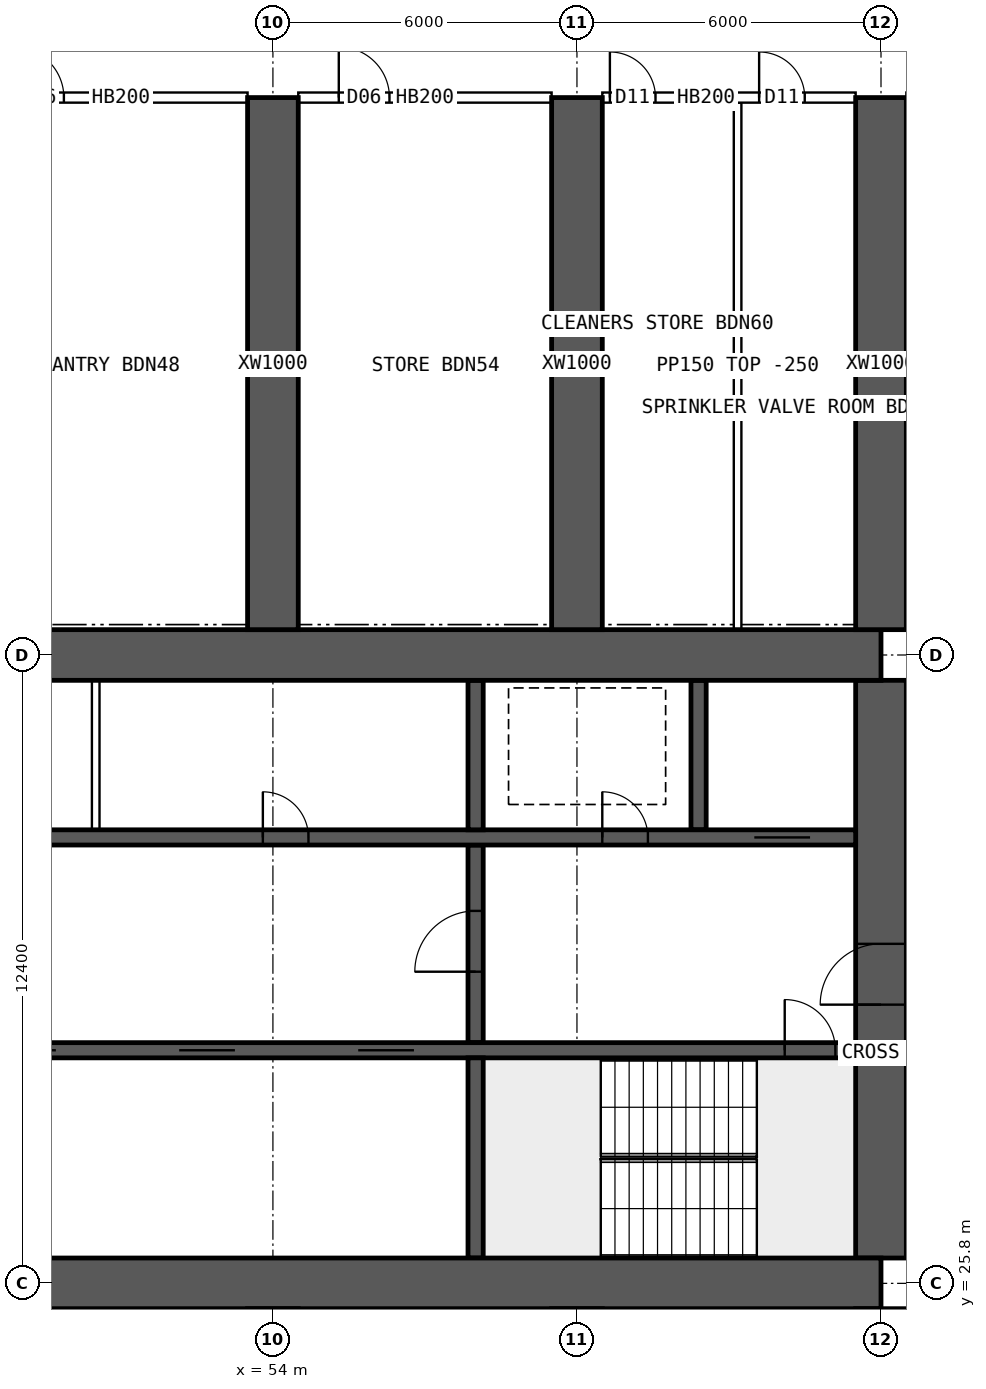
"""IFC4 building model, lengths in metres.
Left out: names, types, materials, properties, quantities, classifications, styles, units other than length and angle.
Written with IfcOpenShell. Run it as: python <this file> out.ifc"""

import sys

from ifc_helpers import new_model, si_unit, direction, frame, frame_2d, origin, place, context, subcontext, project, spatial, rectangle, extrude, element, fill, save


model = new_model("IFC4")
c1 = context("Model", 3, precision=1e-05, world=origin(), true_north=direction((0.0, 1.0)))
c2 = subcontext(c1, "Body", "Model", "MODEL_VIEW")
j1 = project(units=[si_unit("LENGTHUNIT", "METRE"), si_unit("PLANEANGLEUNIT", "RADIAN")], contexts=[c1])
p1 = place(None, origin())
s1 = spatial("IfcSite", under=j1, at=p1, CompositionType="ELEMENT")
p2 = place(p1, origin())
s2 = spatial("IfcBuilding", under=s1, at=p2, CompositionType="ELEMENT")
p3 = place(p2, frame((0.0, 0.0, 16.0)))
s3 = spatial("IfcBuildingStorey", under=s2, at=p3, CompositionType="ELEMENT", Elevation=16.0)
for number, where, z_axis, x_axis in (
    (1, (18.0, 25.8, 0.0), (0.0, 0.0, 1.0), (1.0, 0.0, 0.0)),
    (2, (18.0, 38.2, 0.0), (0.0, 0.0, 1.0), (1.0, 0.0, 0.0)),
):
    element("IfcWall", number, at=place(p3, frame(where, z_axis=z_axis, x_axis=x_axis)), inside=s3, PredefinedType="SHEAR", context=c2, shape_type="SweptSolid", body=[
        extrude(rectangle(XDim=48.0, YDim=1.0, at=frame_2d((24.0, 0.0))), origin(), (0.0, 0.0, 1.0), 4.2),
    ])
p4 = place(p3, frame((66.0, 26.3, 0.0), z_axis=(0.0, 0.0, 1.0), x_axis=(0.0, 1.0, 0.0)))
e3 = element("IfcWall", 3, at=p4, inside=s3, PredefinedType="SHEAR", context=c2, shape_type="SweptSolid", body=[
    extrude(rectangle(XDim=11.4, YDim=1.0, at=frame_2d((5.7, 0.0))), origin(), (0.0, 0.0, 1.0), 4.2),
])
p5 = place(p4, frame((5.0, 0.0, 0.0)))
e4 = element("IfcOpeningElement", 4, at=p5, cuts=e3, PredefinedType="OPENING", context=c2, shape_type="SweptSolid", body=[
    extrude(rectangle(XDim=1.2, YDim=2.1, at=frame_2d((0.6, 1.05))), frame((0.0, 0.51, 0.0), z_axis=(0.0, -1.0, 0.0), x_axis=(1.0, 0.0, 0.0)), (0.0, 0.0, 1.0), 1.02),
])
p6 = place(p3, frame((18.5, 30.4, 0.0), z_axis=(0.0, 0.0, 1.0), x_axis=(1.0, 0.0, 0.0)))
e5 = element("IfcWall", 5, at=p6, inside=s3, PredefinedType="SHEAR", context=c2, shape_type="SweptSolid", body=[
    extrude(rectangle(XDim=47.0, YDim=0.3, at=frame_2d((23.5, 0.0))), origin(), (0.0, 0.0, 1.0), 4.2),
])
p7 = place(p6, frame((0.4, 0.0, 0.0)))
e6 = element("IfcOpeningElement", 6, at=p7, cuts=e5, PredefinedType="OPENING", context=c2, shape_type="SweptSolid", body=[
    extrude(rectangle(XDim=1.0, YDim=2.1, at=frame_2d((0.5, 1.05))), frame((0.0, 0.16, 0.0), z_axis=(0.0, -1.0, 0.0), x_axis=(1.0, 0.0, 0.0)), (0.0, 0.0, 1.0), 0.32),
])
p8 = place(p6, frame((45.6, 0.0, 0.0)))
e7 = element("IfcOpeningElement", 7, at=p8, cuts=e5, PredefinedType="OPENING", context=c2, shape_type="SweptSolid", body=[
    extrude(rectangle(XDim=1.0, YDim=2.1, at=frame_2d((0.5, 1.05))), frame((0.0, 0.16, 0.0), z_axis=(0.0, -1.0, 0.0), x_axis=(1.0, 0.0, 0.0)), (0.0, 0.0, 1.0), 0.32),
])
p9 = place(p6, frame((8.25, 0.0, 0.0)))
e8 = element("IfcOpeningElement", 8, at=p9, cuts=e5, PredefinedType="OPENING", context=c2, shape_type="SweptSolid", body=[
    extrude(rectangle(XDim=1.1, YDim=2.1, at=frame_2d((0.55, 1.05))), frame((0.0, 0.16, 0.0), z_axis=(0.0, -1.0, 0.0), x_axis=(1.0, 0.0, 0.0)), (0.0, 0.0, 1.0), 0.32),
])
p10 = place(p6, frame((10.85, 0.0, 0.0)))
e9 = element("IfcOpeningElement", 9, at=p10, cuts=e5, PredefinedType="OPENING", context=c2, shape_type="SweptSolid", body=[
    extrude(rectangle(XDim=1.1, YDim=2.1, at=frame_2d((0.55, 1.05))), frame((0.0, 0.16, 0.0), z_axis=(0.0, -1.0, 0.0), x_axis=(1.0, 0.0, 0.0)), (0.0, 0.0, 1.0), 0.32),
])
p11 = place(p6, frame((13.45, 0.0, 0.0)))
e10 = element("IfcOpeningElement", 10, at=p11, cuts=e5, PredefinedType="OPENING", context=c2, shape_type="SweptSolid", body=[
    extrude(rectangle(XDim=1.1, YDim=2.1, at=frame_2d((0.55, 1.05))), frame((0.0, 0.16, 0.0), z_axis=(0.0, -1.0, 0.0), x_axis=(1.0, 0.0, 0.0)), (0.0, 0.0, 1.0), 0.32),
])
p12 = place(p6, frame((16.05, 0.0, 0.0)))
e11 = element("IfcOpeningElement", 11, at=p12, cuts=e5, PredefinedType="OPENING", context=c2, shape_type="SweptSolid", body=[
    extrude(rectangle(XDim=1.1, YDim=2.1, at=frame_2d((0.55, 1.05))), frame((0.0, 0.16, 0.0), z_axis=(0.0, -1.0, 0.0), x_axis=(1.0, 0.0, 0.0)), (0.0, 0.0, 1.0), 0.32),
])
p13 = place(p6, frame((30.117, 0.0, 0.0)))
e12 = element("IfcOpeningElement", 12, at=p13, cuts=e5, PredefinedType="OPENING", context=c2, shape_type="SweptSolid", body=[
    extrude(rectangle(XDim=1.1, YDim=2.1, at=frame_2d((0.55, 1.05))), frame((0.0, 0.16, 0.0), z_axis=(0.0, -1.0, 0.0), x_axis=(1.0, 0.0, 0.0)), (0.0, 0.0, 1.0), 0.32),
])
p14 = place(p6, frame((33.65, 0.0, 0.0)))
e13 = element("IfcOpeningElement", 13, at=p14, cuts=e5, PredefinedType="OPENING", context=c2, shape_type="SweptSolid", body=[
    extrude(rectangle(XDim=1.1, YDim=2.1, at=frame_2d((0.55, 1.05))), frame((0.0, 0.16, 0.0), z_axis=(0.0, -1.0, 0.0), x_axis=(1.0, 0.0, 0.0)), (0.0, 0.0, 1.0), 0.32),
])
p15 = place(p6, frame((37.183, 0.0, 0.0)))
e14 = element("IfcOpeningElement", 14, at=p15, cuts=e5, PredefinedType="OPENING", context=c2, shape_type="SweptSolid", body=[
    extrude(rectangle(XDim=1.1, YDim=2.1, at=frame_2d((0.55, 1.05))), frame((0.0, 0.16, 0.0), z_axis=(0.0, -1.0, 0.0), x_axis=(1.0, 0.0, 0.0)), (0.0, 0.0, 1.0), 0.32),
])
p16 = place(p3, frame((18.5, 34.6, 0.0), z_axis=(0.0, 0.0, 1.0), x_axis=(1.0, 0.0, 0.0)))
e15 = element("IfcWall", 15, at=p16, inside=s3, PredefinedType="SHEAR", context=c2, shape_type="SweptSolid", body=[
    extrude(rectangle(XDim=47.0, YDim=0.3, at=frame_2d((23.5, 0.0))), origin(), (0.0, 0.0, 1.0), 4.2),
])
p17 = place(p16, frame((0.9, 0.0, 0.0)))
e16 = element("IfcOpeningElement", 16, at=p17, cuts=e15, PredefinedType="OPENING", context=c2, shape_type="SweptSolid", body=[
    extrude(rectangle(XDim=1.1, YDim=2.1, at=frame_2d((0.55, 1.05))), frame((0.0, 0.16, 0.0), z_axis=(0.0, -1.0, 0.0), x_axis=(1.0, 0.0, 0.0)), (0.0, 0.0, 1.0), 0.32),
])
p18 = place(p16, frame((45.0, 0.0, 0.0)))
e17 = element("IfcOpeningElement", 17, at=p18, cuts=e15, PredefinedType="OPENING", context=c2, shape_type="SweptSolid", body=[
    extrude(rectangle(XDim=1.1, YDim=2.1, at=frame_2d((0.55, 1.05))), frame((0.0, 0.16, 0.0), z_axis=(0.0, -1.0, 0.0), x_axis=(1.0, 0.0, 0.0)), (0.0, 0.0, 1.0), 0.32),
])
p19 = place(p16, frame((4.1, 0.0, 0.0)))
e18 = element("IfcOpeningElement", 18, at=p19, cuts=e15, PredefinedType="OPENING", context=c2, shape_type="SweptSolid", body=[
    extrude(rectangle(XDim=0.9, YDim=2.1, at=frame_2d((0.45, 1.05))), frame((0.0, 0.16, 0.0), z_axis=(0.0, -1.0, 0.0), x_axis=(1.0, 0.0, 0.0)), (0.0, 0.0, 1.0), 0.32),
])
p20 = place(p16, frame((42.0, 0.0, 0.0)))
e19 = element("IfcOpeningElement", 19, at=p20, cuts=e15, PredefinedType="OPENING", context=c2, shape_type="SweptSolid", body=[
    extrude(rectangle(XDim=0.9, YDim=2.1, at=frame_2d((0.45, 1.05))), frame((0.0, 0.16, 0.0), z_axis=(0.0, -1.0, 0.0), x_axis=(1.0, 0.0, 0.0)), (0.0, 0.0, 1.0), 0.32),
])
p21 = place(p16, frame((8.875, 0.0, 0.0)))
e20 = element("IfcOpeningElement", 20, at=p21, cuts=e15, PredefinedType="OPENING", context=c2, shape_type="SweptSolid", body=[
    extrude(rectangle(XDim=0.9, YDim=2.1, at=frame_2d((0.45, 1.05))), frame((0.0, 0.16, 0.0), z_axis=(0.0, -1.0, 0.0), x_axis=(1.0, 0.0, 0.0)), (0.0, 0.0, 1.0), 0.32),
])
p22 = place(p16, frame((12.849, 0.0, 0.0)))
e21 = element("IfcOpeningElement", 21, at=p22, cuts=e15, PredefinedType="OPENING", context=c2, shape_type="SweptSolid", body=[
    extrude(rectangle(XDim=0.9, YDim=2.1, at=frame_2d((0.45, 1.05))), frame((0.0, 0.16, 0.0), z_axis=(0.0, -1.0, 0.0), x_axis=(1.0, 0.0, 0.0)), (0.0, 0.0, 1.0), 0.32),
])
p23 = place(p16, frame((16.496, 0.0, 0.0)))
e22 = element("IfcOpeningElement", 22, at=p23, cuts=e15, PredefinedType="OPENING", context=c2, shape_type="SweptSolid", body=[
    extrude(rectangle(XDim=0.9, YDim=2.1, at=frame_2d((0.45, 1.05))), frame((0.0, 0.16, 0.0), z_axis=(0.0, -1.0, 0.0), x_axis=(1.0, 0.0, 0.0)), (0.0, 0.0, 1.0), 0.32),
])
p24 = place(p16, frame((20.255, 0.0, 0.0)))
e23 = element("IfcOpeningElement", 23, at=p24, cuts=e15, PredefinedType="OPENING", context=c2, shape_type="SweptSolid", body=[
    extrude(rectangle(XDim=0.9, YDim=2.1, at=frame_2d((0.45, 1.05))), frame((0.0, 0.16, 0.0), z_axis=(0.0, -1.0, 0.0), x_axis=(1.0, 0.0, 0.0)), (0.0, 0.0, 1.0), 0.32),
])
p25 = place(p16, frame((24.661, 0.0, 0.0)))
e24 = element("IfcOpeningElement", 24, at=p25, cuts=e15, PredefinedType="OPENING", context=c2, shape_type="SweptSolid", body=[
    extrude(rectangle(XDim=0.9, YDim=2.1, at=frame_2d((0.45, 1.05))), frame((0.0, 0.16, 0.0), z_axis=(0.0, -1.0, 0.0), x_axis=(1.0, 0.0, 0.0)), (0.0, 0.0, 1.0), 0.32),
])
p26 = place(p16, frame((27.458, 0.0, 0.0)))
e25 = element("IfcOpeningElement", 25, at=p26, cuts=e15, PredefinedType="OPENING", context=c2, shape_type="SweptSolid", body=[
    extrude(rectangle(XDim=0.9, YDim=2.1, at=frame_2d((0.45, 1.05))), frame((0.0, 0.16, 0.0), z_axis=(0.0, -1.0, 0.0), x_axis=(1.0, 0.0, 0.0)), (0.0, 0.0, 1.0), 0.32),
])
p27 = place(p16, frame((29.831, 0.0, 0.0)))
e26 = element("IfcOpeningElement", 26, at=p27, cuts=e15, PredefinedType="OPENING", context=c2, shape_type="SweptSolid", body=[
    extrude(rectangle(XDim=0.9, YDim=2.1, at=frame_2d((0.45, 1.05))), frame((0.0, 0.16, 0.0), z_axis=(0.0, -1.0, 0.0), x_axis=(1.0, 0.0, 0.0)), (0.0, 0.0, 1.0), 0.32),
])
p28 = place(p16, frame((35.302, 0.0, 0.0)))
e27 = element("IfcOpeningElement", 27, at=p28, cuts=e15, PredefinedType="OPENING", context=c2, shape_type="SweptSolid", body=[
    extrude(rectangle(XDim=0.9, YDim=2.1, at=frame_2d((0.45, 1.05))), frame((0.0, 0.16, 0.0), z_axis=(0.0, -1.0, 0.0), x_axis=(1.0, 0.0, 0.0)), (0.0, 0.0, 1.0), 0.32),
])
p29 = place(p3, frame((58.0, 26.3, 0.0), z_axis=(0.0, 0.0, 1.0), x_axis=(0.0, 1.0, 0.0)))
e28 = element("IfcWall", 28, at=p29, inside=s3, PredefinedType="SHEAR", context=c2, shape_type="SweptSolid", body=[
    extrude(rectangle(XDim=3.95, YDim=0.3, at=frame_2d((1.975, 0.0))), origin(), (0.0, 0.0, 1.0), 4.2),
])
p30 = place(p3, frame((58.0, 30.55, 0.0), z_axis=(0.0, 0.0, 1.0), x_axis=(0.0, 1.0, 0.0)))
e29 = element("IfcWall", 29, at=p30, inside=s3, PredefinedType="SHEAR", context=c2, shape_type="SweptSolid", body=[
    extrude(rectangle(XDim=3.9, YDim=0.3, at=frame_2d((1.95, 0.0))), origin(), (0.0, 0.0, 1.0), 4.2),
])
p31 = place(p30, frame((1.4, 0.0, 0.0)))
e30 = element("IfcOpeningElement", 30, at=p31, cuts=e29, PredefinedType="OPENING", context=c2, shape_type="SweptSolid", body=[
    extrude(rectangle(XDim=1.2, YDim=2.1, at=frame_2d((0.6, 1.05))), frame((0.0, 0.16, 0.0), z_axis=(0.0, -1.0, 0.0), x_axis=(1.0, 0.0, 0.0)), (0.0, 0.0, 1.0), 0.32),
])
for number, where, z_axis, x_axis in (
    (31, (62.4, 34.75, 0.0), (0.0, 0.0, 1.0), (0.0, 1.0, 0.0)),
    (32, (58.0, 34.75, 0.0), (0.0, 0.0, 1.0), (0.0, 1.0, 0.0)),
):
    element("IfcWall", number, at=place(p3, frame(where, z_axis=z_axis, x_axis=x_axis)), inside=s3, PredefinedType="SHEAR", context=c2, shape_type="SweptSolid", body=[
        extrude(rectangle(XDim=2.95, YDim=0.3, at=frame_2d((1.475, 0.0))), origin(), (0.0, 0.0, 1.0), 4.2),
    ])
for number, where, z_axis, x_axis in (
    (33, (54.0, 38.7, 0.0), (0.0, 0.0, 1.0), (0.0, 1.0, 0.0)),
    (34, (60.0, 38.7, 0.0), (0.0, 0.0, 1.0), (0.0, 1.0, 0.0)),
    (35, (66.0, 38.7, 0.0), (0.0, 0.0, 1.0), (0.0, 1.0, 0.0)),
):
    element("IfcWall", number, at=place(p3, frame(where, z_axis=z_axis, x_axis=x_axis)), inside=s3, PredefinedType="SHEAR", context=c2, shape_type="SweptSolid", body=[
        extrude(rectangle(XDim=10.5, YDim=1.0, at=frame_2d((5.25, 0.0))), origin(), (0.0, 0.0, 1.0), 4.2),
    ])
p32 = place(p3, frame((50.503, 34.75, 0.0), z_axis=(0.0, 0.0, 1.0), x_axis=(0.0, 1.0, 0.0)))
e36 = element("IfcWall", 36, at=p32, inside=s3, PredefinedType="SOLIDWALL", context=c2, shape_type="SweptSolid", body=[
    extrude(rectangle(XDim=2.95, YDim=0.15, at=frame_2d((1.475, 0.0))), origin(), (0.0, 0.0, 1.0), 3.95),
])
p33 = place(p3, frame((48.5, 49.2, 0.0), z_axis=(0.0, 0.0, 1.0), x_axis=(1.0, 0.0, 0.0)))
e37 = element("IfcWall", 37, at=p33, inside=s3, PredefinedType="SOLIDWALL", context=c2, shape_type="SweptSolid", body=[
    extrude(rectangle(XDim=5.0, YDim=0.2, at=frame_2d((2.5, 0.0))), origin(), (0.0, 0.0, 1.0), 3.95),
])
p34 = place(p33, frame((0.375, 0.0, 0.0)))
e38 = element("IfcOpeningElement", 38, at=p34, cuts=e37, PredefinedType="OPENING", context=c2, shape_type="SweptSolid", body=[
    extrude(rectangle(XDim=1.0, YDim=2.1, at=frame_2d((0.5, 1.05))), frame((0.0, 0.11, 0.0), z_axis=(0.0, -1.0, 0.0), x_axis=(1.0, 0.0, 0.0)), (0.0, 0.0, 1.0), 0.22),
])
p35 = place(p3, frame((54.5, 49.2, 0.0), z_axis=(0.0, 0.0, 1.0), x_axis=(1.0, 0.0, 0.0)))
e39 = element("IfcWall", 39, at=p35, inside=s3, PredefinedType="SOLIDWALL", context=c2, shape_type="SweptSolid", body=[
    extrude(rectangle(XDim=5.0, YDim=0.2, at=frame_2d((2.5, 0.0))), origin(), (0.0, 0.0, 1.0), 3.95),
])
p36 = place(p35, frame((0.8, 0.0, 0.0)))
e40 = element("IfcOpeningElement", 40, at=p36, cuts=e39, PredefinedType="OPENING", context=c2, shape_type="SweptSolid", body=[
    extrude(rectangle(XDim=1.0, YDim=2.1, at=frame_2d((0.5, 1.05))), frame((0.0, 0.11, 0.0), z_axis=(0.0, -1.0, 0.0), x_axis=(1.0, 0.0, 0.0)), (0.0, 0.0, 1.0), 0.22),
])
p37 = place(p3, frame((60.5, 49.2, 0.0), z_axis=(0.0, 0.0, 1.0), x_axis=(1.0, 0.0, 0.0)))
e41 = element("IfcWall", 41, at=p37, inside=s3, PredefinedType="SOLIDWALL", context=c2, shape_type="SweptSolid", body=[
    extrude(rectangle(XDim=5.0, YDim=0.2, at=frame_2d((2.5, 0.0))), origin(), (0.0, 0.0, 1.0), 3.95),
])
p38 = place(p37, frame((0.15, 0.0, 0.0)))
e42 = element("IfcOpeningElement", 42, at=p38, cuts=e41, PredefinedType="OPENING", context=c2, shape_type="SweptSolid", body=[
    extrude(rectangle(XDim=0.9, YDim=2.1, at=frame_2d((0.45, 1.05))), frame((0.0, 0.11, 0.0), z_axis=(0.0, -1.0, 0.0), x_axis=(1.0, 0.0, 0.0)), (0.0, 0.0, 1.0), 0.22),
])
p39 = place(p37, frame((3.095, 0.0, 0.0)))
e43 = element("IfcOpeningElement", 43, at=p39, cuts=e41, PredefinedType="OPENING", context=c2, shape_type="SweptSolid", body=[
    extrude(rectangle(XDim=0.9, YDim=2.1, at=frame_2d((0.45, 1.05))), frame((0.0, 0.11, 0.0), z_axis=(0.0, -1.0, 0.0), x_axis=(1.0, 0.0, 0.0)), (0.0, 0.0, 1.0), 0.22),
])
for number, where, z_axis, x_axis in (
    (44, (62.4, 14.9, 0.0), (0.0, 0.0, 1.0), (0.0, 1.0, 0.0)),
    (45, (63.17, 38.7, 0.0), (0.0, 0.0, 1.0), (0.0, 1.0, 0.0)),
):
    element("IfcWall", number, at=place(p3, frame(where, z_axis=z_axis, x_axis=x_axis)), inside=s3, PredefinedType="PARTITIONING", context=c2, shape_type="SweptSolid", body=[
        extrude(rectangle(XDim=10.4, YDim=0.15, at=frame_2d((5.2, 0.0))), origin(), (0.0, 0.0, 1.0), 3.95),
    ])
p40 = place(p5, origin())
e46 = element("IfcDoor", 46, at=p40, inside=s3, OperationType="SINGLE_SWING_LEFT", PredefinedType="DOOR", context=c2, shape_type="SweptSolid", body=[
    extrude(rectangle(XDim=1.2, YDim=2.1, at=frame_2d((0.6, 1.05))), frame((0.0, 0.025, 0.0), z_axis=(0.0, -1.0, 0.0), x_axis=(1.0, 0.0, 0.0)), (0.0, 0.0, 1.0), 0.05),
])
fill(e4, e46)
p41 = place(p8, origin())
e47 = element("IfcDoor", 47, at=p41, inside=s3, OperationType="SINGLE_SWING_LEFT", PredefinedType="DOOR", context=c2, shape_type="SweptSolid", body=[
    extrude(rectangle(XDim=1.0, YDim=2.1, at=frame_2d((0.5, 1.05))), frame((0.0, 0.025, 0.0), z_axis=(0.0, -1.0, 0.0), x_axis=(1.0, 0.0, 0.0)), (0.0, 0.0, 1.0), 0.05),
])
fill(e7, e47)
p42 = place(p18, origin())
e48 = element("IfcDoor", 48, at=p42, inside=s3, OperationType="DOUBLE_DOOR_SLIDING", PredefinedType="DOOR", context=c2, shape_type="SweptSolid", body=[
    extrude(rectangle(XDim=1.1, YDim=2.1, at=frame_2d((0.55, 1.05))), frame((0.0, 0.025, 0.0), z_axis=(0.0, -1.0, 0.0), x_axis=(1.0, 0.0, 0.0)), (0.0, 0.0, 1.0), 0.05),
])
fill(e17, e48)
p43 = place(p20, origin())
e49 = element("IfcDoor", 49, at=p43, inside=s3, OperationType="SINGLE_SWING_LEFT", PredefinedType="DOOR", context=c2, shape_type="SweptSolid", body=[
    extrude(rectangle(XDim=0.9, YDim=2.1, at=frame_2d((0.45, 1.05))), frame((0.0, 0.025, 0.0), z_axis=(0.0, -1.0, 0.0), x_axis=(1.0, 0.0, 0.0)), (0.0, 0.0, 1.0), 0.05),
])
fill(e19, e49)
p44 = place(p31, origin())
e50 = element("IfcDoor", 50, at=p44, inside=s3, OperationType="SINGLE_SWING_LEFT", PredefinedType="DOOR", context=c2, shape_type="SweptSolid", body=[
    extrude(rectangle(XDim=1.2, YDim=2.1, at=frame_2d((0.6, 1.05))), frame((0.0, 0.025, 0.0), z_axis=(0.0, -1.0, 0.0), x_axis=(1.0, 0.0, 0.0)), (0.0, 0.0, 1.0), 0.05),
])
fill(e30, e50)
p45 = place(p28, origin())
e51 = element("IfcDoor", 51, at=p45, inside=s3, OperationType="SINGLE_SWING_LEFT", PredefinedType="DOOR", context=c2, shape_type="SweptSolid", body=[
    extrude(rectangle(XDim=0.9, YDim=2.1, at=frame_2d((0.45, 1.05))), frame((0.0, 0.025, 0.0), z_axis=(0.0, -1.0, 0.0), x_axis=(1.0, 0.0, 0.0)), (0.0, 0.0, 1.0), 0.05),
])
fill(e27, e51)
p46 = place(p13, origin())
e52 = element("IfcDoor", 52, at=p46, inside=s3, OperationType="DOUBLE_DOOR_SLIDING", PredefinedType="DOOR", context=c2, shape_type="SweptSolid", body=[
    extrude(rectangle(XDim=1.1, YDim=2.1, at=frame_2d((0.55, 1.05))), frame((0.0, 0.025, 0.0), z_axis=(0.0, -1.0, 0.0), x_axis=(1.0, 0.0, 0.0)), (0.0, 0.0, 1.0), 0.05),
])
fill(e12, e52)
p47 = place(p14, origin())
e53 = element("IfcDoor", 53, at=p47, inside=s3, OperationType="DOUBLE_DOOR_SLIDING", PredefinedType="DOOR", context=c2, shape_type="SweptSolid", body=[
    extrude(rectangle(XDim=1.1, YDim=2.1, at=frame_2d((0.55, 1.05))), frame((0.0, 0.025, 0.0), z_axis=(0.0, -1.0, 0.0), x_axis=(1.0, 0.0, 0.0)), (0.0, 0.0, 1.0), 0.05),
])
fill(e13, e53)
p48 = place(p15, origin())
e54 = element("IfcDoor", 54, at=p48, inside=s3, OperationType="DOUBLE_DOOR_SLIDING", PredefinedType="DOOR", context=c2, shape_type="SweptSolid", body=[
    extrude(rectangle(XDim=1.1, YDim=2.1, at=frame_2d((0.55, 1.05))), frame((0.0, 0.025, 0.0), z_axis=(0.0, -1.0, 0.0), x_axis=(1.0, 0.0, 0.0)), (0.0, 0.0, 1.0), 0.05),
])
fill(e14, e54)
p49 = place(p34, origin())
e55 = element("IfcDoor", 55, at=p49, inside=s3, OperationType="SINGLE_SWING_LEFT", PredefinedType="DOOR", context=c2, shape_type="SweptSolid", body=[
    extrude(rectangle(XDim=1.0, YDim=2.1, at=frame_2d((0.5, 1.05))), frame((0.0, 0.025, 0.0), z_axis=(0.0, -1.0, 0.0), x_axis=(1.0, 0.0, 0.0)), (0.0, 0.0, 1.0), 0.05),
])
fill(e38, e55)
p50 = place(p36, origin())
e56 = element("IfcDoor", 56, at=p50, inside=s3, OperationType="SINGLE_SWING_LEFT", PredefinedType="DOOR", context=c2, shape_type="SweptSolid", body=[
    extrude(rectangle(XDim=1.0, YDim=2.1, at=frame_2d((0.5, 1.05))), frame((0.0, 0.025, 0.0), z_axis=(0.0, -1.0, 0.0), x_axis=(1.0, 0.0, 0.0)), (0.0, 0.0, 1.0), 0.05),
])
fill(e40, e56)
p51 = place(p38, origin())
e57 = element("IfcDoor", 57, at=p51, inside=s3, OperationType="SINGLE_SWING_LEFT", PredefinedType="DOOR", context=c2, shape_type="SweptSolid", body=[
    extrude(rectangle(XDim=0.9, YDim=2.1, at=frame_2d((0.45, 1.05))), frame((0.0, 0.025, 0.0), z_axis=(0.0, -1.0, 0.0), x_axis=(1.0, 0.0, 0.0)), (0.0, 0.0, 1.0), 0.05),
])
fill(e42, e57)
p52 = place(p39, origin())
e58 = element("IfcDoor", 58, at=p52, inside=s3, OperationType="SINGLE_SWING_LEFT", PredefinedType="DOOR", context=c2, shape_type="SweptSolid", body=[
    extrude(rectangle(XDim=0.9, YDim=2.1, at=frame_2d((0.45, 1.05))), frame((0.0, 0.025, 0.0), z_axis=(0.0, -1.0, 0.0), x_axis=(1.0, 0.0, 0.0)), (0.0, 0.0, 1.0), 0.05),
])
fill(e43, e58)
save(model, sys.argv[1])
